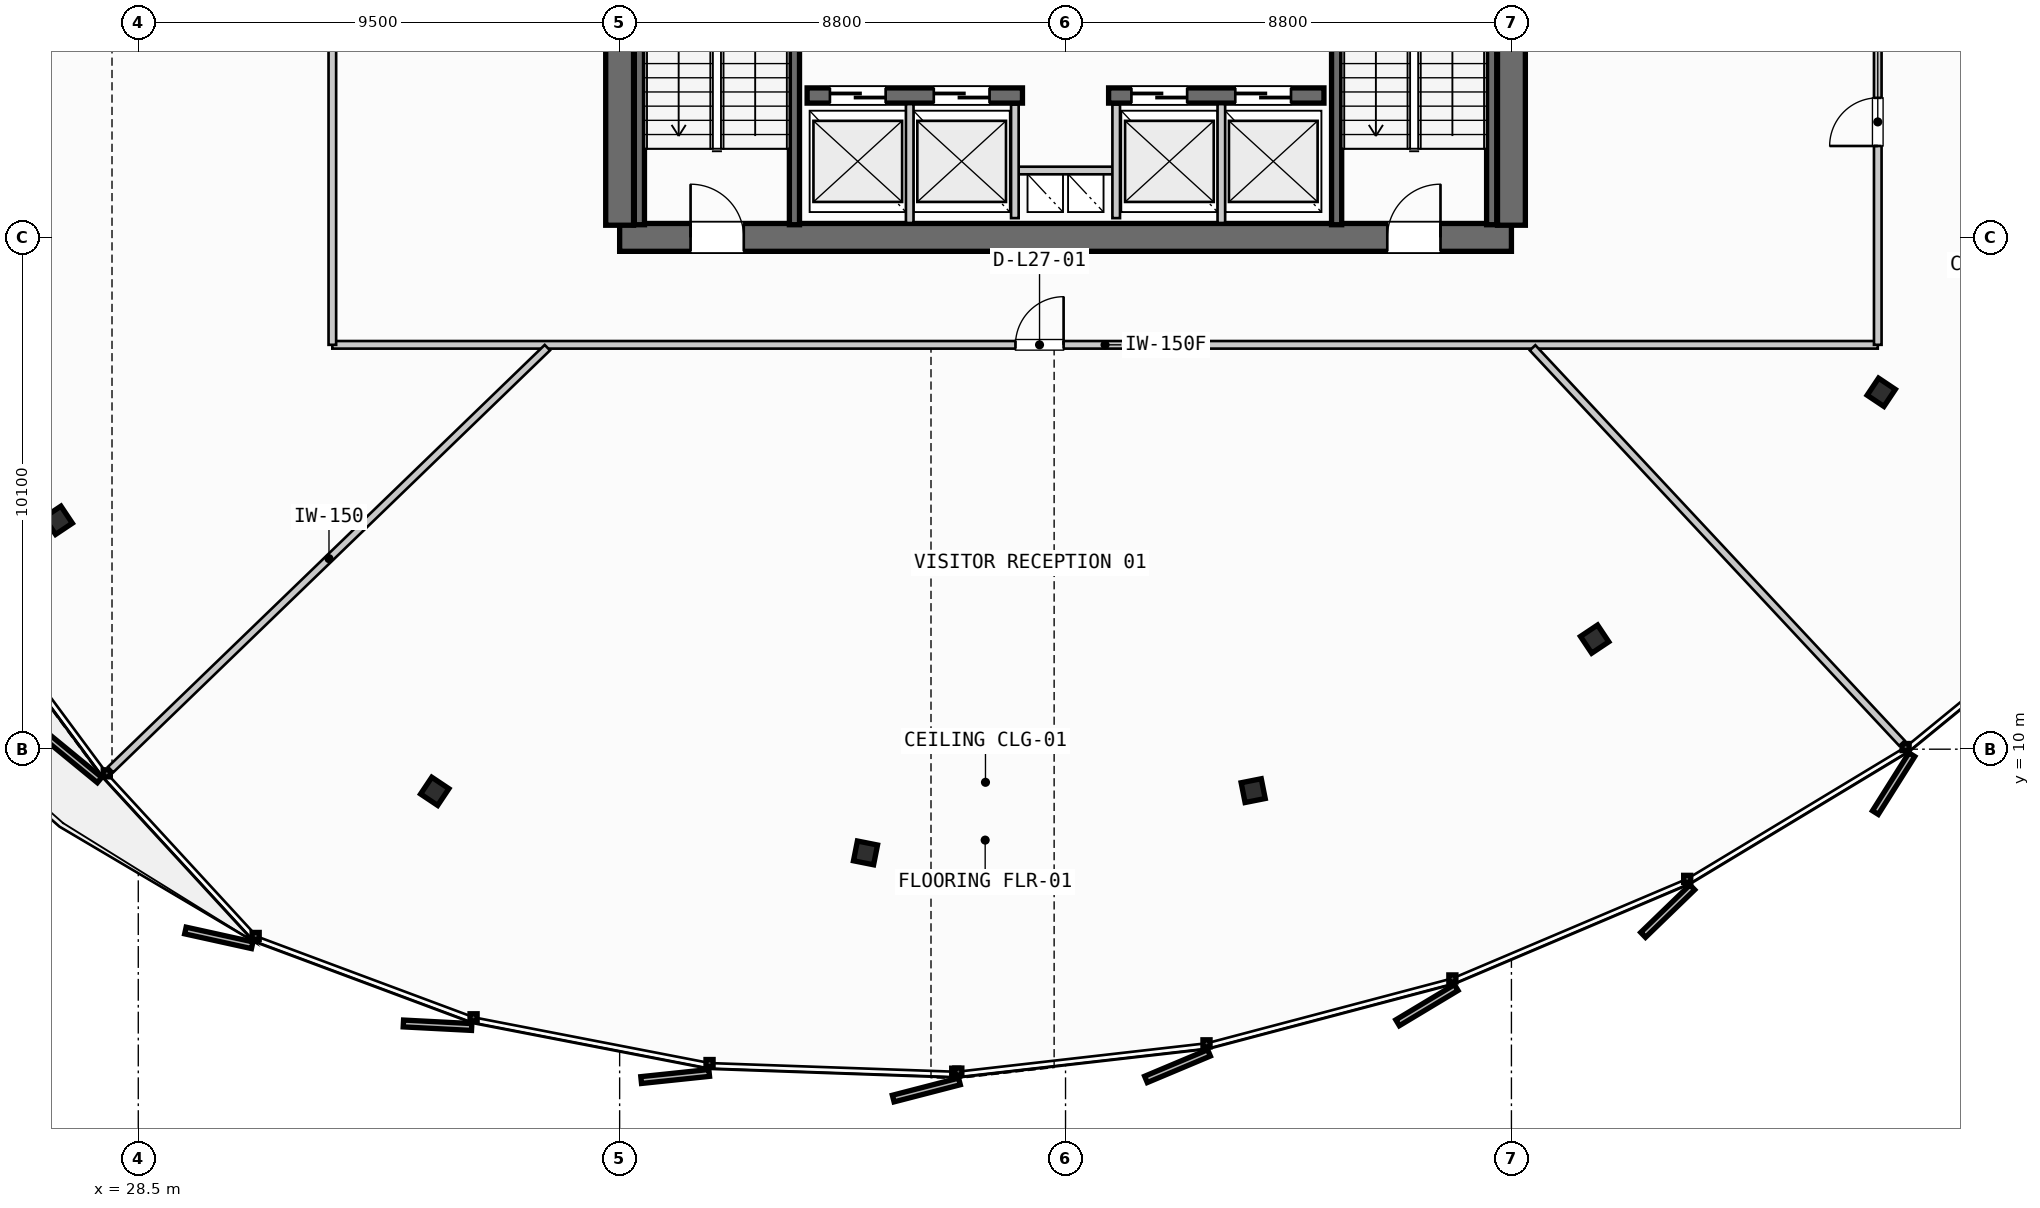
"""IFC4 building model, lengths in metres.
Left out: names, types, materials, properties, quantities, classifications, styles, units other than length and angle.
Written with IfcOpenShell. Run it as: python <this file> out.ifc"""

import sys

from ifc_helpers import new_model, si_unit, direction, frame, frame_2d, origin, origin_2d, place, context, subcontext, project, spatial, rectangle, i_section, extrude, source, transform, mapped, element, fill, save


model = new_model("IFC4")
c1 = context("Model", 3, precision=1e-05, world=origin(), true_north=direction((0.0, 1.0)))
c2 = subcontext(c1, "Body", "Model", "MODEL_VIEW")
j1 = project(units=[si_unit("LENGTHUNIT", "METRE"), si_unit("PLANEANGLEUNIT", "RADIAN")], contexts=[c1])
p1 = place(None, origin())
s1 = spatial("IfcSite", under=j1, at=p1, CompositionType="ELEMENT")
p2 = place(p1, origin())
s2 = spatial("IfcBuilding", under=s1, at=p2, CompositionType="ELEMENT")
p3 = place(p2, frame((0.0, 0.0, 110.8)))
s3 = spatial("IfcBuildingStorey", under=s2, at=p3, CompositionType="ELEMENT", Elevation=110.8)
p4 = place(p3, frame((38.0, 20.1, 0.0), z_axis=(0.0, 0.0, 1.0), x_axis=(1.0, 0.0, 0.0)))
e1 = element("IfcWall", 1, at=p4, inside=s3, PredefinedType="SHEAR", context=c2, shape_type="SweptSolid", body=[
    extrude(rectangle(XDim=17.6, YDim=0.55, at=frame_2d((8.8, 0.0))), origin(), (0.0, 0.0, 1.0), 3.35),
])
p5 = place(p4, frame((1.4, 0.0, 0.0)))
e2 = element("IfcOpeningElement", 2, at=p5, cuts=e1, PredefinedType="OPENING", context=c2, shape_type="SweptSolid", body=[
    extrude(rectangle(XDim=1.05, YDim=2.15, at=frame_2d((0.525, 1.075))), frame((0.0, 0.285, 0.0), z_axis=(0.0, -1.0, 0.0), x_axis=(1.0, 0.0, 0.0)), (0.0, 0.0, 1.0), 0.57),
])
p6 = place(p4, frame((15.15, 0.0, 0.0)))
e3 = element("IfcOpeningElement", 3, at=p6, cuts=e1, PredefinedType="OPENING", context=c2, shape_type="SweptSolid", body=[
    extrude(rectangle(XDim=1.05, YDim=2.15, at=frame_2d((0.525, 1.075))), frame((0.0, 0.285, 0.0), z_axis=(0.0, -1.0, 0.0), x_axis=(1.0, 0.0, 0.0)), (0.0, 0.0, 1.0), 0.57),
])
p7 = place(p3, frame((38.0, 35.26, 0.0), z_axis=(0.0, 0.0, 1.0), x_axis=(0.0, -1.0, 0.0)))
e4 = element("IfcWall", 4, at=p7, inside=s3, PredefinedType="SHEAR", context=c2, shape_type="SweptSolid", body=[
    extrude(rectangle(XDim=14.92, YDim=0.55, at=frame_2d((7.46, 0.0))), origin(), (0.0, 0.0, 1.0), 3.35),
])
p8 = place(p7, frame((5.21, 0.0, 0.0)))
e5 = element("IfcOpeningElement", 5, at=p8, cuts=e4, PredefinedType="OPENING", context=c2, shape_type="SweptSolid", body=[
    extrude(rectangle(XDim=1.1, YDim=2.2, at=frame_2d((0.55, 1.1))), frame((0.0, 0.285, 0.0), z_axis=(0.0, -1.0, 0.0), x_axis=(1.0, 0.0, 0.0)), (0.0, 0.0, 1.0), 0.57),
])
p9 = place(p3, frame((55.6, 20.34, 0.0), z_axis=(0.0, 0.0, 1.0), x_axis=(0.0, 1.0, 0.0)))
e6 = element("IfcWall", 6, at=p9, inside=s3, PredefinedType="SHEAR", context=c2, shape_type="SweptSolid", body=[
    extrude(rectangle(XDim=14.92, YDim=0.55, at=frame_2d((7.46, 0.0))), origin(), (0.0, 0.0, 1.0), 3.35),
])
p10 = place(p9, frame((12.71, 0.0, 0.0)))
e7 = element("IfcOpeningElement", 7, at=p10, cuts=e6, PredefinedType="OPENING", context=c2, shape_type="SweptSolid", body=[
    extrude(rectangle(XDim=1.05, YDim=2.15, at=frame_2d((0.525, 1.075))), frame((0.0, 0.285, 0.0), z_axis=(0.0, -1.0, 0.0), x_axis=(1.0, 0.0, 0.0)), (0.0, 0.0, 1.0), 0.57),
])
p11 = place(p9, frame((8.61, 0.0, 0.0)))
e8 = element("IfcOpeningElement", 8, at=p11, cuts=e6, PredefinedType="OPENING", context=c2, shape_type="SweptSolid", body=[
    extrude(rectangle(XDim=1.1, YDim=2.2, at=frame_2d((0.55, 1.1))), frame((0.0, 0.285, 0.0), z_axis=(0.0, -1.0, 0.0), x_axis=(1.0, 0.0, 0.0)), (0.0, 0.0, 1.0), 0.57),
])
p12 = place(p3, frame((41.7, 22.9, 0.0), z_axis=(0.0, 0.0, 1.0), x_axis=(1.0, 0.0, 0.0)))
e9 = element("IfcWall", 9, at=p12, inside=s3, PredefinedType="SHEAR", context=c2, shape_type="SweptSolid", body=[
    extrude(rectangle(XDim=4.25, YDim=0.3, at=frame_2d((2.125, 0.0))), origin(), (0.0, 0.0, 1.0), 3.35),
])
p13 = place(p12, frame((0.45, 0.0, 0.0)))
e10 = element("IfcOpeningElement", 10, at=p13, cuts=e9, PredefinedType="OPENING", context=c2, shape_type="SweptSolid", body=[
    extrude(rectangle(XDim=1.1, YDim=2.2, at=frame_2d((0.55, 1.1))), frame((0.0, 0.16, 0.0), z_axis=(0.0, -1.0, 0.0), x_axis=(1.0, 0.0, 0.0)), (0.0, 0.0, 1.0), 0.32),
])
p14 = place(p12, frame((2.5, 0.0, 0.0)))
e11 = element("IfcOpeningElement", 11, at=p14, cuts=e9, PredefinedType="OPENING", context=c2, shape_type="SweptSolid", body=[
    extrude(rectangle(XDim=1.1, YDim=2.2, at=frame_2d((0.55, 1.1))), frame((0.0, 0.16, 0.0), z_axis=(0.0, -1.0, 0.0), x_axis=(1.0, 0.0, 0.0)), (0.0, 0.0, 1.0), 0.32),
])
p15 = place(p3, frame((47.65, 22.9, 0.0), z_axis=(0.0, 0.0, 1.0), x_axis=(1.0, 0.0, 0.0)))
e12 = element("IfcWall", 12, at=p15, inside=s3, PredefinedType="SHEAR", context=c2, shape_type="SweptSolid", body=[
    extrude(rectangle(XDim=4.25, YDim=0.3, at=frame_2d((2.125, 0.0))), origin(), (0.0, 0.0, 1.0), 3.35),
])
p16 = place(p15, frame((0.45, 0.0, 0.0)))
e13 = element("IfcOpeningElement", 13, at=p16, cuts=e12, PredefinedType="OPENING", context=c2, shape_type="SweptSolid", body=[
    extrude(rectangle(XDim=1.1, YDim=2.2, at=frame_2d((0.55, 1.1))), frame((0.0, 0.16, 0.0), z_axis=(0.0, -1.0, 0.0), x_axis=(1.0, 0.0, 0.0)), (0.0, 0.0, 1.0), 0.32),
])
p17 = place(p15, frame((2.5, 0.0, 0.0)))
e14 = element("IfcOpeningElement", 14, at=p17, cuts=e12, PredefinedType="OPENING", context=c2, shape_type="SweptSolid", body=[
    extrude(rectangle(XDim=1.1, YDim=2.2, at=frame_2d((0.55, 1.1))), frame((0.0, 0.16, 0.0), z_axis=(0.0, -1.0, 0.0), x_axis=(1.0, 0.0, 0.0)), (0.0, 0.0, 1.0), 0.32),
])
m1 = source(origin(), c2, "Body", "SweptSolid", [
    extrude(i_section(OverallWidth=0.405, OverallDepth=0.398, WebThickness=0.035, FlangeThickness=0.056, FilletRadius=0.015, at=origin_2d()), origin(), (0.0, 0.0, 1.0), 3.35),
])
for number, where, z_axis, x_axis in (
    (15, (26.921, 14.517, 0.0), (0.0, 0.0, 1.0), (-0.831, -0.556, 0.0)),
    (16, (34.351, 9.168, 0.0), (0.0, 0.0, 1.0), (-0.556, -0.831, 0.0)),
    (17, (42.852, 7.954, 0.0), (0.0, 0.0, 1.0), (-0.195, -0.981, 0.0)),
    (18, (50.503, 9.182, 0.0), (0.0, 0.0, 1.0), (0.195, -0.981, 0.0)),
    (19, (57.242, 12.172, 0.0), (0.0, 0.0, 1.0), (0.556, -0.831, 0.0)),
    (20, (62.899, 17.043, 0.0), (0.0, 0.0, 1.0), (0.831, -0.556, 0.0)),
):
    element("IfcColumn", number, at=place(p3, frame(where, z_axis=z_axis, x_axis=x_axis)), inside=s3, PredefinedType="COLUMN", context=c2, shape_type="MappedRepresentation", body=[
        mapped(m1, transform((0.0, 0.0, 0.0), scale=1.0)),
    ])
for number, where, z_axis, x_axis in (
    (21, (41.45, 27.7, 0.0), (0.0, 0.0, 1.0), (0.0, -1.0, 0.0)),
    (22, (38.39, 20.35, 0.0), (0.0, 0.0, 1.0), (0.0, 1.0, 0.0)),
    (23, (55.21, 27.7, 0.0), (0.0, 0.0, 1.0), (0.0, -1.0, 0.0)),
    (24, (52.15, 20.35, 0.0), (0.0, 0.0, 1.0), (0.0, 1.0, 0.0)),
):
    element("IfcWall", number, at=place(p3, frame(where, z_axis=z_axis, x_axis=x_axis)), inside=s3, PredefinedType="SHEAR", context=c2, shape_type="SweptSolid", body=[
        extrude(rectangle(XDim=7.35, YDim=0.2, at=frame_2d((3.675, 0.0))), origin(), (0.0, 0.0, 1.0), 3.35),
    ])
p18 = place(p3, frame((45.8, 21.42, 0.0), z_axis=(0.0, 0.0, 1.0), x_axis=(1.0, 0.0, 0.0)))
e25 = element("IfcWall", 25, at=p18, inside=s3, PredefinedType="PARTITIONING", context=c2, shape_type="SweptSolid", body=[
    extrude(rectangle(XDim=2.0, YDim=0.15, at=frame_2d((1.0, 0.0))), origin(), (0.0, 0.0, 1.0), 2.28),
])
for number, where, z_axis, x_axis in (
    (26, (45.8, 20.48, 0.0), (0.0, 0.0, 1.0), (0.0, 1.0, 0.0)),
    (27, (47.8, 20.48, 0.0), (0.0, 0.0, 1.0), (0.0, 1.0, 0.0)),
):
    element("IfcWall", number, at=place(p3, frame(where, z_axis=z_axis, x_axis=x_axis)), inside=s3, PredefinedType="PARTITIONING", context=c2, shape_type="SweptSolid", body=[
        extrude(rectangle(XDim=2.24, YDim=0.15, at=frame_2d((1.12, 0.0))), origin(), (0.0, 0.0, 1.0), 2.28),
    ])
for number, where, z_axis, x_axis in (
    (28, (43.725, 20.385, 0.0), (0.0, 0.0, 1.0), (0.0, 1.0, 0.0)),
    (29, (49.875, 20.385, 0.0), (0.0, 0.0, 1.0), (0.0, 1.0, 0.0)),
):
    element("IfcWall", number, at=place(p3, frame(where, z_axis=z_axis, x_axis=x_axis)), inside=s3, PredefinedType="PARTITIONING", context=c2, shape_type="SweptSolid", body=[
        extrude(rectangle(XDim=2.345, YDim=0.15, at=frame_2d((1.172, 0.0))), origin(), (0.0, 0.0, 1.0), 2.28),
    ])
p19 = place(p3, frame((32.33, 17.98, 0.0), z_axis=(0.0, 0.0, 1.0), x_axis=(1.0, 0.0, 0.0)))
e30 = element("IfcWall", 30, at=p19, inside=s3, PredefinedType="PARTITIONING", context=c2, shape_type="SweptSolid", body=[
    extrude(rectangle(XDim=30.5, YDim=0.15, at=frame_2d((15.25, 0.0))), origin(), (0.0, 0.0, 1.0), 2.28),
])
p20 = place(p19, frame((13.482, 0.0, 0.0)))
e31 = element("IfcOpeningElement", 31, at=p20, cuts=e30, PredefinedType="OPENING", context=c2, shape_type="SweptSolid", body=[
    extrude(rectangle(XDim=0.95, YDim=2.15, at=frame_2d((0.475, 1.075))), frame((0.0, 0.085, 0.0), z_axis=(0.0, -1.0, 0.0), x_axis=(1.0, 0.0, 0.0)), (0.0, 0.0, 1.0), 0.17),
])
p21 = place(p3, frame((62.83, 17.98, 0.0), z_axis=(0.0, 0.0, 1.0), x_axis=(0.0, 1.0, 0.0)))
e32 = element("IfcWall", 32, at=p21, inside=s3, PredefinedType="PARTITIONING", context=c2, shape_type="SweptSolid", body=[
    extrude(rectangle(XDim=19.22, YDim=0.15, at=frame_2d((9.61, 0.0))), origin(), (0.0, 0.0, 1.0), 2.28),
])
p22 = place(p21, frame((3.924, 0.0, 0.0)))
e33 = element("IfcOpeningElement", 33, at=p22, cuts=e32, PredefinedType="OPENING", context=c2, shape_type="SweptSolid", body=[
    extrude(rectangle(XDim=0.95, YDim=2.15, at=frame_2d((0.475, 1.075))), frame((0.0, 0.085, 0.0), z_axis=(0.0, -1.0, 0.0), x_axis=(1.0, 0.0, 0.0)), (0.0, 0.0, 1.0), 0.17),
])
p23 = place(p21, frame((12.61, 0.0, 0.0)))
e34 = element("IfcOpeningElement", 34, at=p23, cuts=e32, PredefinedType="OPENING", context=c2, shape_type="SweptSolid", body=[
    extrude(rectangle(XDim=0.95, YDim=2.15, at=frame_2d((0.475, 1.075))), frame((0.0, 0.085, 0.0), z_axis=(0.0, -1.0, 0.0), x_axis=(1.0, 0.0, 0.0)), (0.0, 0.0, 1.0), 0.17),
])
p24 = place(p3, frame((32.33, 37.2, 0.0), z_axis=(0.0, 0.0, 1.0), x_axis=(0.0, -1.0, 0.0)))
e35 = element("IfcWall", 35, at=p24, inside=s3, PredefinedType="PARTITIONING", context=c2, shape_type="SweptSolid", body=[
    extrude(rectangle(XDim=19.22, YDim=0.15, at=frame_2d((9.61, 0.0))), origin(), (0.0, 0.0, 1.0), 2.28),
])
p25 = place(p24, frame((10.09, 0.0, 0.0)))
e36 = element("IfcOpeningElement", 36, at=p25, cuts=e35, PredefinedType="OPENING", context=c2, shape_type="SweptSolid", body=[
    extrude(rectangle(XDim=0.95, YDim=2.15, at=frame_2d((0.475, 1.075))), frame((0.0, 0.085, 0.0), z_axis=(0.0, -1.0, 0.0), x_axis=(1.0, 0.0, 0.0)), (0.0, 0.0, 1.0), 0.17),
])
p26 = place(p3, frame((36.573, 17.924, 0.0), z_axis=(0.0, 0.0, 1.0), x_axis=(-0.719183453683, -0.694820235708, 0.0)))
e37 = element("IfcWall", 37, at=p26, inside=s3, PredefinedType="PARTITIONING", context=c2, shape_type="SweptSolid", body=[
    extrude(rectangle(XDim=11.985, YDim=0.15, at=frame_2d((5.992, 0.0))), origin(), (0.0, 0.0, 1.0), 2.28),
])
p27 = place(p3, frame((56.017, 17.921, 0.0), z_axis=(0.0, 0.0, 1.0), x_axis=(0.682716489206, -0.730683375592, 0.0)))
e38 = element("IfcWall", 38, at=p27, inside=s3, PredefinedType="PARTITIONING", context=c2, shape_type="SweptSolid", body=[
    extrude(rectangle(XDim=10.678, YDim=0.15, at=frame_2d((5.339, 0.0))), origin(), (0.0, 0.0, 1.0), 2.28),
])
m2 = source(origin(), c2, "Body", "SweptSolid", [
    extrude(rectangle(XDim=1.05, YDim=2.15, at=frame_2d((0.525, 1.075))), frame((0.0, 0.025, 0.0), z_axis=(0.0, -1.0, 0.0), x_axis=(1.0, 0.0, 0.0)), (0.0, 0.0, 1.0), 0.05),
])
p28 = place(p5, origin())
e39 = element("IfcDoor", 39, at=p28, inside=s3, OperationType="SINGLE_SWING_LEFT", PredefinedType="DOOR", context=c2, shape_type="MappedRepresentation", body=[
    mapped(m2, transform((0.0, 0.0, 0.0), scale=1.0)),
])
fill(e2, e39)
p29 = place(p6, origin())
e40 = element("IfcDoor", 40, at=p29, inside=s3, OperationType="SINGLE_SWING_RIGHT", PredefinedType="DOOR", context=c2, shape_type="MappedRepresentation", body=[
    mapped(m2, transform((0.0, 0.0, 0.0), scale=1.0)),
])
fill(e3, e40)
m3 = source(origin(), c2, "Body", "SweptSolid", [
    extrude(rectangle(XDim=1.1, YDim=2.2, at=frame_2d((0.55, 1.1))), frame((0.0, 0.025, 0.0), z_axis=(0.0, -1.0, 0.0), x_axis=(1.0, 0.0, 0.0)), (0.0, 0.0, 1.0), 0.05),
])
p30 = place(p13, origin())
e41 = element("IfcDoor", 41, at=p30, inside=s3, OperationType="SLIDING_TO_LEFT", PredefinedType="DOOR", context=c2, shape_type="MappedRepresentation", body=[
    mapped(m3, transform((0.0, 0.0, 0.0), scale=1.0)),
])
fill(e10, e41)
p31 = place(p14, origin())
e42 = element("IfcDoor", 42, at=p31, inside=s3, OperationType="SLIDING_TO_LEFT", PredefinedType="DOOR", context=c2, shape_type="MappedRepresentation", body=[
    mapped(m3, transform((0.0, 0.0, 0.0), scale=1.0)),
])
fill(e11, e42)
p32 = place(p16, origin())
e43 = element("IfcDoor", 43, at=p32, inside=s3, OperationType="SLIDING_TO_LEFT", PredefinedType="DOOR", context=c2, shape_type="MappedRepresentation", body=[
    mapped(m3, transform((0.0, 0.0, 0.0), scale=1.0)),
])
fill(e13, e43)
p33 = place(p17, origin())
e44 = element("IfcDoor", 44, at=p33, inside=s3, OperationType="SLIDING_TO_LEFT", PredefinedType="DOOR", context=c2, shape_type="MappedRepresentation", body=[
    mapped(m3, transform((0.0, 0.0, 0.0), scale=1.0)),
])
fill(e14, e44)
m4 = source(origin(), c2, "Body", "SweptSolid", [
    extrude(rectangle(XDim=0.95, YDim=2.15, at=frame_2d((0.475, 1.075))), frame((0.0, 0.025, 0.0), z_axis=(0.0, -1.0, 0.0), x_axis=(1.0, 0.0, 0.0)), (0.0, 0.0, 1.0), 0.05),
])
p34 = place(p20, origin())
e45 = element("IfcDoor", 45, at=p34, inside=s3, OperationType="SINGLE_SWING_RIGHT", PredefinedType="DOOR", context=c2, shape_type="MappedRepresentation", body=[
    mapped(m4, transform((0.0, 0.0, 0.0), scale=1.0)),
])
fill(e31, e45)
p35 = place(p22, origin())
e46 = element("IfcDoor", 46, at=p35, inside=s3, OperationType="SINGLE_SWING_LEFT", PredefinedType="DOOR", context=c2, shape_type="MappedRepresentation", body=[
    mapped(m4, transform((0.0, 0.0, 0.0), scale=1.0)),
])
fill(e33, e46)
save(model, sys.argv[1])
